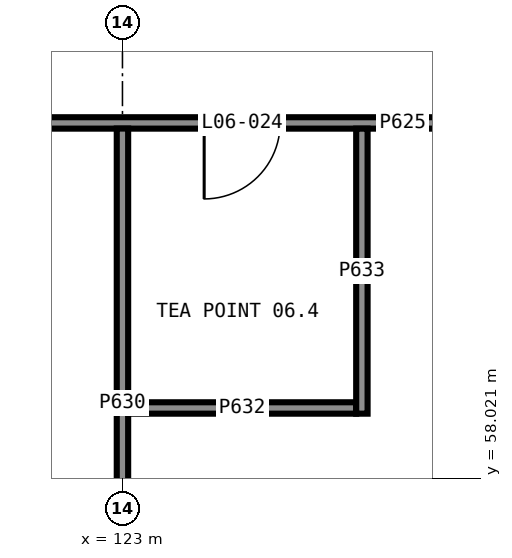
"""IFC4 building model, lengths in metres.
Left out: names, types, materials, properties, quantities, classifications, styles, units other than length and angle.
Written with IfcOpenShell. Run it as: python <this file> out.ifc"""

import sys

from ifc_helpers import new_model, si_unit, direction, frame, frame_2d, origin, place, context, subcontext, project, spatial, rectangle, extrude, element, fill, save


model = new_model("IFC4")
c1 = context("Model", 3, precision=1e-05, world=origin(), true_north=direction((0.0, 1.0)))
c2 = subcontext(c1, "Body", "Model", "MODEL_VIEW")
j1 = project(units=[si_unit("LENGTHUNIT", "METRE"), si_unit("PLANEANGLEUNIT", "RADIAN")], contexts=[c1])
p1 = place(None, origin())
s1 = spatial("IfcSite", under=j1, at=p1, CompositionType="ELEMENT")
p2 = place(p1, origin())
s2 = spatial("IfcBuilding", under=s1, at=p2, CompositionType="ELEMENT")
p3 = place(p2, frame((0.0, 0.0, 25.5)))
s3 = spatial("IfcBuildingStorey", under=s2, at=p3, CompositionType="ELEMENT", Elevation=25.5)
p4 = place(p3, frame((132.6, 62.7, 0.0), z_axis=(0.0, 0.0, 1.0), x_axis=(-1.0, 0.0, 0.0)))
e1 = element("IfcWall", 1, at=p4, inside=s3, PredefinedType="PARTITIONING", context=c2, shape_type="SweptSolid", body=[
    extrude(rectangle(XDim=11.825, YDim=0.15, at=frame_2d((5.913, 0.0))), origin(), (0.0, 0.0, 1.0), 3.58),
])
p5 = place(p4, frame((7.525, 0.0, 0.0)))
e2 = element("IfcOpeningElement", 2, at=p5, cuts=e1, PredefinedType="OPENING", context=c2, shape_type="SweptSolid", body=[
    extrude(rectangle(XDim=1.0, YDim=2.1, at=frame_2d((0.5, 1.05))), frame((0.0, 0.085, 0.0), z_axis=(0.0, -1.0, 0.0), x_axis=(1.0, 0.0, 0.0)), (0.0, 0.0, 1.0), 0.17),
])
p6 = place(p3, frame((123.0, 55.4, 0.0), z_axis=(0.0, 0.0, 1.0), x_axis=(0.0, 1.0, 0.0)))
e3 = element("IfcWall", 3, at=p6, inside=s3, PredefinedType="PARTITIONING", context=c2, shape_type="SweptSolid", body=[
    extrude(rectangle(XDim=7.226, YDim=0.15, at=frame_2d((3.613, 0.0))), origin(), (0.0, 0.0, 1.0), 2.68),
])
p7 = place(p3, frame((123.075, 58.95, 0.0), z_axis=(0.0, 0.0, 1.0), x_axis=(1.0, 0.0, 0.0)))
e4 = element("IfcWall", 4, at=p7, inside=s3, PredefinedType="PARTITIONING", context=c2, shape_type="SweptSolid", body=[
    extrude(rectangle(XDim=3.0, YDim=0.15, at=frame_2d((1.5, 0.0))), origin(), (0.0, 0.0, 1.0), 3.58),
])
p8 = place(p3, frame((126.15, 62.625, 0.0), z_axis=(0.0, 0.0, 1.0), x_axis=(0.0, -1.0, 0.0)))
e5 = element("IfcWall", 5, at=p8, inside=s3, PredefinedType="PARTITIONING", context=c2, shape_type="SweptSolid", body=[
    extrude(rectangle(XDim=3.75, YDim=0.15, at=frame_2d((1.875, 0.0))), origin(), (0.0, 0.0, 1.0), 3.58),
])
p9 = place(p5, origin())
e6 = element("IfcDoor", 6, at=p9, inside=s3, OperationType="SINGLE_SWING_LEFT", PredefinedType="DOOR", context=c2, shape_type="SweptSolid", body=[
    extrude(rectangle(XDim=1.0, YDim=2.1, at=frame_2d((0.5, 1.05))), frame((0.0, 0.025, 0.0), z_axis=(0.0, -1.0, 0.0), x_axis=(1.0, 0.0, 0.0)), (0.0, 0.0, 1.0), 0.05),
])
fill(e2, e6)
save(model, sys.argv[1])
